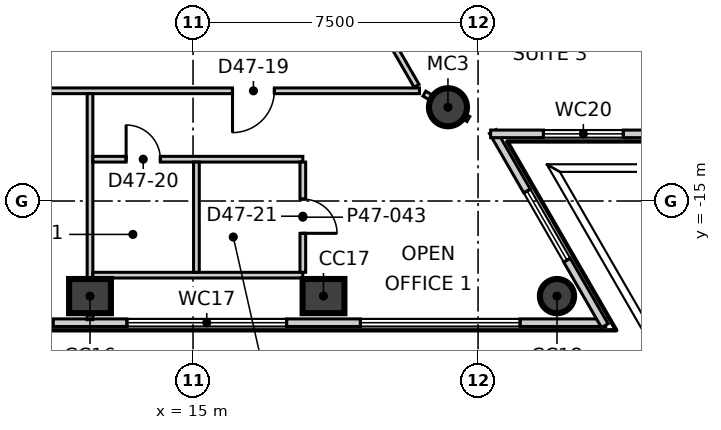
"""IFC4 building model, lengths in metres.
Left out: names, types, materials, properties, quantities, classifications, styles, units other than length and angle.
Written with IfcOpenShell. Run it as: python <this file> out.ifc"""

import sys

from ifc_helpers import new_model, si_unit, direction, frame, frame_2d, origin, origin_2d, place, context, subcontext, project, spatial, rectangle, circle, extrude, element, fill, save


model = new_model("IFC4")
c1 = context("Model", 3, precision=1e-05, world=origin(), true_north=direction((0.0, 1.0)))
c2 = subcontext(c1, "Body", "Model", "MODEL_VIEW")
j1 = project(units=[si_unit("LENGTHUNIT", "METRE"), si_unit("PLANEANGLEUNIT", "RADIAN")], contexts=[c1])
p1 = place(None, origin())
s1 = spatial("IfcSite", under=j1, at=p1, CompositionType="ELEMENT")
p2 = place(p1, origin())
s2 = spatial("IfcBuilding", under=s1, at=p2, CompositionType="ELEMENT")
p3 = place(p2, frame((0.0, 0.0, 203.3)))
s3 = spatial("IfcBuildingStorey", under=s2, at=p3, CompositionType="ELEMENT", Elevation=203.3)
for number, where, z_axis, x_axis in (
    (1, (12.289, -17.502, -0.3), (0.0, 0.0, 1.0), (1.0, 0.0, 0.0)),
    (2, (18.433, -17.502, -0.3), (0.0, 0.0, 1.0), (1.0, 0.0, 0.0)),
):
    element("IfcColumn", number, at=place(p3, frame(where, z_axis=z_axis, x_axis=x_axis)), inside=s3, PredefinedType="COLUMN", context=c2, shape_type="SweptSolid", body=[
        extrude(rectangle(XDim=1.1, YDim=0.9, at=origin_2d()), origin(), (0.0, 0.0, 1.0), 4.0),
    ])
p4 = place(p3, frame((24.577, -17.502, -0.3), z_axis=(0.0, 0.0, 1.0), x_axis=(1.0, 0.0, 0.0)))
e3 = element("IfcColumn", 3, at=p4, inside=s3, PredefinedType="COLUMN", context=c2, shape_type="SweptSolid", body=[
    extrude(circle(Radius=0.45, at=origin_2d()), origin(), (0.0, 0.0, 1.0), 4.0),
])
p5 = place(p3, frame((21.708, -12.533, -0.3), z_axis=(0.0, 0.0, 1.0), x_axis=(1.0, 0.0, 0.0)))
e4 = element("IfcColumn", 4, at=p5, inside=s3, PredefinedType="COLUMN", context=c2, shape_type="SweptSolid", body=[
    extrude(circle(Radius=0.5, at=origin_2d()), origin(), (0.0, 0.0, 1.0), 4.0),
])
p6 = place(p3, frame((-25.88, -18.202, 0.0), z_axis=(0.0, 0.0, 1.0), x_axis=(1.0, 0.0, 0.0)))
e5 = element("IfcWall", 5, at=p6, inside=s3, PredefinedType="ELEMENTEDWALL", context=c2, shape_type="SweptSolid", body=[
    extrude(rectangle(XDim=51.74, YDim=0.2, at=frame_2d((25.87, 0.0))), origin(), (0.0, 0.0, 1.0), 3.7),
])
p7 = place(p6, frame((2.275, 0.0, 0.9)))
e6 = element("IfcOpeningElement", 6, at=p7, cuts=e5, PredefinedType="OPENING", context=c2, shape_type="SweptSolid", body=[
    extrude(rectangle(XDim=4.2, YDim=2.5, at=frame_2d((2.1, 1.25))), frame((0.0, 0.11, 0.0), z_axis=(0.0, -1.0, 0.0), x_axis=(1.0, 0.0, 0.0)), (0.0, 0.0, 1.0), 0.22),
])
p8 = place(p6, frame((8.419, 0.0, 0.9)))
e7 = element("IfcOpeningElement", 7, at=p8, cuts=e5, PredefinedType="OPENING", context=c2, shape_type="SweptSolid", body=[
    extrude(rectangle(XDim=4.2, YDim=2.5, at=frame_2d((2.1, 1.25))), frame((0.0, 0.11, 0.0), z_axis=(0.0, -1.0, 0.0), x_axis=(1.0, 0.0, 0.0)), (0.0, 0.0, 1.0), 0.22),
])
p9 = place(p6, frame((14.564, 0.0, 0.9)))
e8 = element("IfcOpeningElement", 8, at=p9, cuts=e5, PredefinedType="OPENING", context=c2, shape_type="SweptSolid", body=[
    extrude(rectangle(XDim=4.2, YDim=2.5, at=frame_2d((2.1, 1.25))), frame((0.0, 0.11, 0.0), z_axis=(0.0, -1.0, 0.0), x_axis=(1.0, 0.0, 0.0)), (0.0, 0.0, 1.0), 0.22),
])
p10 = place(p6, frame((20.708, 0.0, 0.9)))
e9 = element("IfcOpeningElement", 9, at=p10, cuts=e5, PredefinedType="OPENING", context=c2, shape_type="SweptSolid", body=[
    extrude(rectangle(XDim=4.2, YDim=2.5, at=frame_2d((2.1, 1.25))), frame((0.0, 0.11, 0.0), z_axis=(0.0, -1.0, 0.0), x_axis=(1.0, 0.0, 0.0)), (0.0, 0.0, 1.0), 0.22),
])
p11 = place(p6, frame((26.852, 0.0, 0.9)))
e10 = element("IfcOpeningElement", 10, at=p11, cuts=e5, PredefinedType="OPENING", context=c2, shape_type="SweptSolid", body=[
    extrude(rectangle(XDim=4.2, YDim=2.5, at=frame_2d((2.1, 1.25))), frame((0.0, 0.11, 0.0), z_axis=(0.0, -1.0, 0.0), x_axis=(1.0, 0.0, 0.0)), (0.0, 0.0, 1.0), 0.22),
])
p12 = place(p6, frame((32.996, 0.0, 0.9)))
e11 = element("IfcOpeningElement", 11, at=p12, cuts=e5, PredefinedType="OPENING", context=c2, shape_type="SweptSolid", body=[
    extrude(rectangle(XDim=4.2, YDim=2.5, at=frame_2d((2.1, 1.25))), frame((0.0, 0.11, 0.0), z_axis=(0.0, -1.0, 0.0), x_axis=(1.0, 0.0, 0.0)), (0.0, 0.0, 1.0), 0.22),
])
p13 = place(p6, frame((39.141, 0.0, 0.9)))
e12 = element("IfcOpeningElement", 12, at=p13, cuts=e5, PredefinedType="OPENING", context=c2, shape_type="SweptSolid", body=[
    extrude(rectangle(XDim=4.2, YDim=2.5, at=frame_2d((2.1, 1.25))), frame((0.0, 0.11, 0.0), z_axis=(0.0, -1.0, 0.0), x_axis=(1.0, 0.0, 0.0)), (0.0, 0.0, 1.0), 0.22),
])
p14 = place(p6, frame((45.285, 0.0, 0.9)))
e13 = element("IfcOpeningElement", 13, at=p14, cuts=e5, PredefinedType="OPENING", context=c2, shape_type="SweptSolid", body=[
    extrude(rectangle(XDim=4.2, YDim=2.5, at=frame_2d((2.1, 1.25))), frame((0.0, 0.11, 0.0), z_axis=(0.0, -1.0, 0.0), x_axis=(1.0, 0.0, 0.0)), (0.0, 0.0, 1.0), 0.22),
])
p15 = place(p3, frame((25.835, -18.28, 0.0), z_axis=(0.0, 0.0, 1.0), x_axis=(-0.499989993172, 0.866031181152, 0.0)))
e14 = element("IfcWall", 14, at=p15, inside=s3, PredefinedType="ELEMENTEDWALL", context=c2, shape_type="SweptSolid", body=[
    extrude(rectangle(XDim=5.898, YDim=0.2, at=frame_2d((2.949, 0.0))), origin(), (0.0, 0.0, 1.0), 3.7),
])
p16 = place(p15, frame((1.99, 0.0, 0.9)))
e15 = element("IfcOpeningElement", 15, at=p16, cuts=e14, PredefinedType="OPENING", context=c2, shape_type="SweptSolid", body=[
    extrude(rectangle(XDim=2.1, YDim=2.5, at=frame_2d((1.05, 1.25))), frame((0.0, 0.11, 0.0), z_axis=(0.0, -1.0, 0.0), x_axis=(1.0, 0.0, 0.0)), (0.0, 0.0, 1.0), 0.22),
])
p17 = place(p3, frame((22.831, -13.233, 0.0), z_axis=(0.0, 0.0, 1.0), x_axis=(1.0, 0.0, 0.0)))
e16 = element("IfcWall", 16, at=p17, inside=s3, PredefinedType="ELEMENTEDWALL", context=c2, shape_type="SweptSolid", body=[
    extrude(rectangle(XDim=5.898, YDim=0.2, at=frame_2d((2.949, 0.0))), origin(), (0.0, 0.0, 1.0), 3.7),
])
p18 = place(p17, frame((1.39, 0.0, 0.9)))
e17 = element("IfcOpeningElement", 17, at=p18, cuts=e16, PredefinedType="OPENING", context=c2, shape_type="SweptSolid", body=[
    extrude(rectangle(XDim=2.1, YDim=2.5, at=frame_2d((1.05, 1.25))), frame((0.0, 0.11, 0.0), z_axis=(0.0, -1.0, 0.0), x_axis=(1.0, 0.0, 0.0)), (0.0, 0.0, 1.0), 0.22),
])
p19 = place(p3, frame((28.704, -13.311, 0.0), z_axis=(0.0, 0.0, 1.0), x_axis=(-0.500010281129, 0.866019467891, 0.0)))
e18 = element("IfcWall", 18, at=p19, inside=s3, PredefinedType="ELEMENTEDWALL", context=c2, shape_type="SweptSolid", body=[
    extrude(rectangle(XDim=51.739, YDim=0.2, at=frame_2d((25.87, 0.0))), origin(), (0.0, 0.0, 1.0), 3.7),
])
p20 = place(p19, frame((2.275, 0.0, 0.9)))
e19 = element("IfcOpeningElement", 19, at=p20, cuts=e18, PredefinedType="OPENING", context=c2, shape_type="SweptSolid", body=[
    extrude(rectangle(XDim=4.2, YDim=2.5, at=frame_2d((2.1, 1.25))), frame((0.0, 0.11, 0.0), z_axis=(0.0, -1.0, 0.0), x_axis=(1.0, 0.0, 0.0)), (0.0, 0.0, 1.0), 0.22),
])
p21 = place(p19, frame((8.419, 0.0, 0.9)))
e20 = element("IfcOpeningElement", 20, at=p21, cuts=e18, PredefinedType="OPENING", context=c2, shape_type="SweptSolid", body=[
    extrude(rectangle(XDim=4.2, YDim=2.5, at=frame_2d((2.1, 1.25))), frame((0.0, 0.11, 0.0), z_axis=(0.0, -1.0, 0.0), x_axis=(1.0, 0.0, 0.0)), (0.0, 0.0, 1.0), 0.22),
])
p22 = place(p19, frame((14.563, 0.0, 0.9)))
e21 = element("IfcOpeningElement", 21, at=p22, cuts=e18, PredefinedType="OPENING", context=c2, shape_type="SweptSolid", body=[
    extrude(rectangle(XDim=4.2, YDim=2.5, at=frame_2d((2.1, 1.25))), frame((0.0, 0.11, 0.0), z_axis=(0.0, -1.0, 0.0), x_axis=(1.0, 0.0, 0.0)), (0.0, 0.0, 1.0), 0.22),
])
p23 = place(p19, frame((20.707, 0.0, 0.9)))
e22 = element("IfcOpeningElement", 22, at=p23, cuts=e18, PredefinedType="OPENING", context=c2, shape_type="SweptSolid", body=[
    extrude(rectangle(XDim=4.2, YDim=2.5, at=frame_2d((2.1, 1.25))), frame((0.0, 0.11, 0.0), z_axis=(0.0, -1.0, 0.0), x_axis=(1.0, 0.0, 0.0)), (0.0, 0.0, 1.0), 0.22),
])
p24 = place(p19, frame((26.852, 0.0, 0.9)))
e23 = element("IfcOpeningElement", 23, at=p24, cuts=e18, PredefinedType="OPENING", context=c2, shape_type="SweptSolid", body=[
    extrude(rectangle(XDim=4.2, YDim=2.5, at=frame_2d((2.1, 1.25))), frame((0.0, 0.11, 0.0), z_axis=(0.0, -1.0, 0.0), x_axis=(1.0, 0.0, 0.0)), (0.0, 0.0, 1.0), 0.22),
])
p25 = place(p19, frame((32.996, 0.0, 0.9)))
e24 = element("IfcOpeningElement", 24, at=p25, cuts=e18, PredefinedType="OPENING", context=c2, shape_type="SweptSolid", body=[
    extrude(rectangle(XDim=4.2, YDim=2.5, at=frame_2d((2.1, 1.25))), frame((0.0, 0.11, 0.0), z_axis=(0.0, -1.0, 0.0), x_axis=(1.0, 0.0, 0.0)), (0.0, 0.0, 1.0), 0.22),
])
p26 = place(p19, frame((39.14, 0.0, 0.9)))
e25 = element("IfcOpeningElement", 25, at=p26, cuts=e18, PredefinedType="OPENING", context=c2, shape_type="SweptSolid", body=[
    extrude(rectangle(XDim=4.2, YDim=2.5, at=frame_2d((2.1, 1.25))), frame((0.0, 0.11, 0.0), z_axis=(0.0, -1.0, 0.0), x_axis=(1.0, 0.0, 0.0)), (0.0, 0.0, 1.0), 0.22),
])
p27 = place(p19, frame((45.284, 0.0, 0.9)))
e26 = element("IfcOpeningElement", 26, at=p27, cuts=e18, PredefinedType="OPENING", context=c2, shape_type="SweptSolid", body=[
    extrude(rectangle(XDim=4.2, YDim=2.5, at=frame_2d((2.1, 1.25))), frame((0.0, 0.11, 0.0), z_axis=(0.0, -1.0, 0.0), x_axis=(1.0, 0.0, 0.0)), (0.0, 0.0, 1.0), 0.22),
])
p28 = place(p3, frame((-20.808, -12.1, 0.0), z_axis=(0.0, 0.0, 1.0), x_axis=(1.0, 0.0, 0.0)))
e27 = element("IfcWall", 27, at=p28, inside=s3, PredefinedType="PARTITIONING", context=c2, shape_type="SweptSolid", body=[
    extrude(rectangle(XDim=41.766, YDim=0.15, at=frame_2d((20.883, 0.0))), origin(), (0.0, 0.0, 1.0), 3.7),
])
p29 = place(p28, frame((3.6, 0.0, 0.0)))
e28 = element("IfcOpeningElement", 28, at=p29, cuts=e27, PredefinedType="OPENING", context=c2, shape_type="SweptSolid", body=[
    extrude(rectangle(XDim=1.1, YDim=2.1, at=frame_2d((0.55, 1.05))), frame((0.0, 0.085, 0.0), z_axis=(0.0, -1.0, 0.0), x_axis=(1.0, 0.0, 0.0)), (0.0, 0.0, 1.0), 0.17),
])
p30 = place(p28, frame((17.07, 0.0, 0.0)))
e29 = element("IfcOpeningElement", 29, at=p30, cuts=e27, PredefinedType="OPENING", context=c2, shape_type="SweptSolid", body=[
    extrude(rectangle(XDim=1.1, YDim=2.1, at=frame_2d((0.55, 1.05))), frame((0.0, 0.085, 0.0), z_axis=(0.0, -1.0, 0.0), x_axis=(1.0, 0.0, 0.0)), (0.0, 0.0, 1.0), 0.17),
])
p31 = place(p28, frame((9.87, 0.0, 0.0)))
e30 = element("IfcOpeningElement", 30, at=p31, cuts=e27, PredefinedType="OPENING", context=c2, shape_type="SweptSolid", body=[
    extrude(rectangle(XDim=0.9, YDim=2.1, at=frame_2d((0.45, 1.05))), frame((0.0, 0.085, 0.0), z_axis=(0.0, -1.0, 0.0), x_axis=(1.0, 0.0, 0.0)), (0.0, 0.0, 1.0), 0.17),
])
p32 = place(p28, frame((12.87, 0.0, 0.0)))
e31 = element("IfcOpeningElement", 31, at=p32, cuts=e27, PredefinedType="OPENING", context=c2, shape_type="SweptSolid", body=[
    extrude(rectangle(XDim=0.9, YDim=2.1, at=frame_2d((0.45, 1.05))), frame((0.0, 0.085, 0.0), z_axis=(0.0, -1.0, 0.0), x_axis=(1.0, 0.0, 0.0)), (0.0, 0.0, 1.0), 0.17),
])
p33 = place(p28, frame((27.658, 0.0, 0.0)))
e32 = element("IfcOpeningElement", 32, at=p33, cuts=e27, PredefinedType="OPENING", context=c2, shape_type="SweptSolid", body=[
    extrude(rectangle(XDim=1.0, YDim=2.1, at=frame_2d((0.5, 1.05))), frame((0.0, 0.085, 0.0), z_axis=(0.0, -1.0, 0.0), x_axis=(1.0, 0.0, 0.0)), (0.0, 0.0, 1.0), 0.17),
])
p34 = place(p28, frame((21.558, 0.0, 0.0)))
e33 = element("IfcOpeningElement", 33, at=p34, cuts=e27, PredefinedType="OPENING", context=c2, shape_type="SweptSolid", body=[
    extrude(rectangle(XDim=0.9, YDim=2.1, at=frame_2d((0.45, 1.05))), frame((0.0, 0.085, 0.0), z_axis=(0.0, -1.0, 0.0), x_axis=(1.0, 0.0, 0.0)), (0.0, 0.0, 1.0), 0.17),
])
p35 = place(p28, frame((36.847, 0.0, 0.0)))
e34 = element("IfcOpeningElement", 34, at=p35, cuts=e27, PredefinedType="OPENING", context=c2, shape_type="SweptSolid", body=[
    extrude(rectangle(XDim=1.1, YDim=2.1, at=frame_2d((0.55, 1.05))), frame((0.0, 0.085, 0.0), z_axis=(0.0, -1.0, 0.0), x_axis=(1.0, 0.0, 0.0)), (0.0, 0.0, 1.0), 0.17),
])
p36 = place(p3, frame((21.087, -12.175, 0.0), z_axis=(0.0, 0.0, 1.0), x_axis=(0.8662585361, -0.499595985407, 0.0)))
e35 = element("IfcWall", 35, at=p36, inside=s3, PredefinedType="PARTITIONING", context=c2, shape_type="SweptSolid", body=[
    extrude(rectangle(XDim=1.337, YDim=0.15, at=frame_2d((0.668, 0.0))), origin(), (0.0, 0.0, 1.0), 3.2),
])
p37 = place(p3, frame((0.075, 24.07, 0.0), z_axis=(0.0, 0.0, 1.0), x_axis=(0.500006834213, -0.866021458014, 0.0)))
e36 = element("IfcWall", 36, at=p37, inside=s3, PredefinedType="PARTITIONING", context=c2, shape_type="SweptSolid", body=[
    extrude(rectangle(XDim=41.616, YDim=0.15, at=frame_2d((20.808, 0.0))), origin(), (0.0, 0.0, 1.0), 3.7),
])
p38 = place(p37, frame((36.915, 0.0, 0.0)))
e37 = element("IfcOpeningElement", 37, at=p38, cuts=e36, PredefinedType="OPENING", context=c2, shape_type="SweptSolid", body=[
    extrude(rectangle(XDim=1.1, YDim=2.1, at=frame_2d((0.55, 1.05))), frame((0.0, 0.085, 0.0), z_axis=(0.0, -1.0, 0.0), x_axis=(1.0, 0.0, 0.0)), (0.0, 0.0, 1.0), 0.17),
])
p39 = place(p37, frame((22.046, 0.0, 0.0)))
e38 = element("IfcOpeningElement", 38, at=p39, cuts=e36, PredefinedType="OPENING", context=c2, shape_type="SweptSolid", body=[
    extrude(rectangle(XDim=1.1, YDim=2.1, at=frame_2d((0.55, 1.05))), frame((0.0, 0.085, 0.0), z_axis=(0.0, -1.0, 0.0), x_axis=(1.0, 0.0, 0.0)), (0.0, 0.0, 1.0), 0.17),
])
p40 = place(p37, frame((31.046, 0.0, 0.0)))
e39 = element("IfcOpeningElement", 39, at=p40, cuts=e36, PredefinedType="OPENING", context=c2, shape_type="SweptSolid", body=[
    extrude(rectangle(XDim=0.9, YDim=2.1, at=frame_2d((0.45, 1.05))), frame((0.0, 0.085, 0.0), z_axis=(0.0, -1.0, 0.0), x_axis=(1.0, 0.0, 0.0)), (0.0, 0.0, 1.0), 0.17),
])
p41 = place(p37, frame((27.846, 0.0, 0.0)))
e40 = element("IfcOpeningElement", 40, at=p41, cuts=e36, PredefinedType="OPENING", context=c2, shape_type="SweptSolid", body=[
    extrude(rectangle(XDim=0.9, YDim=2.1, at=frame_2d((0.45, 1.05))), frame((0.0, 0.085, 0.0), z_axis=(0.0, -1.0, 0.0), x_axis=(1.0, 0.0, 0.0)), (0.0, 0.0, 1.0), 0.17),
])
p42 = place(p37, frame((24.946, 0.0, 0.0)))
e41 = element("IfcOpeningElement", 41, at=p42, cuts=e36, PredefinedType="OPENING", context=c2, shape_type="SweptSolid", body=[
    extrude(rectangle(XDim=1.0, YDim=2.1, at=frame_2d((0.5, 1.05))), frame((0.0, 0.085, 0.0), z_axis=(0.0, -1.0, 0.0), x_axis=(1.0, 0.0, 0.0)), (0.0, 0.0, 1.0), 0.17),
])
p43 = place(p37, frame((17.258, 0.0, 0.0)))
e42 = element("IfcOpeningElement", 42, at=p43, cuts=e36, PredefinedType="OPENING", context=c2, shape_type="SweptSolid", body=[
    extrude(rectangle(XDim=1.0, YDim=2.1, at=frame_2d((0.5, 1.05))), frame((0.0, 0.085, 0.0), z_axis=(0.0, -1.0, 0.0), x_axis=(1.0, 0.0, 0.0)), (0.0, 0.0, 1.0), 0.17),
])
p44 = place(p37, frame((11.114, 0.0, 0.0)))
e43 = element("IfcOpeningElement", 43, at=p44, cuts=e36, PredefinedType="OPENING", context=c2, shape_type="SweptSolid", body=[
    extrude(rectangle(XDim=1.0, YDim=2.1, at=frame_2d((0.5, 1.05))), frame((0.0, 0.085, 0.0), z_axis=(0.0, -1.0, 0.0), x_axis=(1.0, 0.0, 0.0)), (0.0, 0.0, 1.0), 0.17),
])
p45 = place(p37, frame((3.669, 0.0, 0.0)))
e44 = element("IfcOpeningElement", 44, at=p45, cuts=e36, PredefinedType="OPENING", context=c2, shape_type="SweptSolid", body=[
    extrude(rectangle(XDim=1.0, YDim=2.1, at=frame_2d((0.5, 1.05))), frame((0.0, 0.085, 0.0), z_axis=(0.0, -1.0, 0.0), x_axis=(1.0, 0.0, 0.0)), (0.0, 0.0, 1.0), 0.17),
])
p46 = place(p3, frame((12.289, -18.122, 0.0), z_axis=(0.0, 0.0, 1.0), x_axis=(0.0, 1.0, 0.0)))
e45 = element("IfcWall", 45, at=p46, inside=s3, PredefinedType="PARTITIONING", context=c2, shape_type="SweptSolid", body=[
    extrude(rectangle(XDim=5.947, YDim=0.15, at=frame_2d((2.974, 0.0))), origin(), (0.0, 0.0, 1.0), 3.7),
])
p47 = place(p3, frame((12.364, -13.9, 0.0), z_axis=(0.0, 0.0, 1.0), x_axis=(1.0, 0.0, 0.0)))
e46 = element("IfcWall", 46, at=p47, inside=s3, PredefinedType="PARTITIONING", context=c2, shape_type="SweptSolid", body=[
    extrude(rectangle(XDim=5.525, YDim=0.15, at=frame_2d((2.762, 0.0))), origin(), (0.0, 0.0, 1.0), 3.7),
])
p48 = place(p47, frame((0.875, 0.0, 0.0)))
e47 = element("IfcOpeningElement", 47, at=p48, cuts=e46, PredefinedType="OPENING", context=c2, shape_type="SweptSolid", body=[
    extrude(rectangle(XDim=0.9, YDim=2.1, at=frame_2d((0.45, 1.05))), frame((0.0, 0.085, 0.0), z_axis=(0.0, -1.0, 0.0), x_axis=(1.0, 0.0, 0.0)), (0.0, 0.0, 1.0), 0.17),
])
p49 = place(p3, frame((12.364, -16.951, 0.0), z_axis=(0.0, 0.0, 1.0), x_axis=(1.0, 0.0, 0.0)))
e48 = element("IfcWall", 48, at=p49, inside=s3, PredefinedType="PARTITIONING", context=c2, shape_type="SweptSolid", body=[
    extrude(rectangle(XDim=5.525, YDim=0.15, at=frame_2d((2.762, 0.0))), origin(), (0.0, 0.0, 1.0), 3.7),
])
p50 = place(p3, frame((17.889, -16.876, 0.0), z_axis=(0.0, 0.0, 1.0), x_axis=(0.0, 1.0, 0.0)))
e49 = element("IfcWall", 49, at=p50, inside=s3, PredefinedType="PARTITIONING", context=c2, shape_type="SweptSolid", body=[
    extrude(rectangle(XDim=2.901, YDim=0.15, at=frame_2d((1.45, 0.0))), origin(), (0.0, 0.0, 1.0), 3.7),
])
p51 = place(p50, frame((1.026, 0.0, 0.0)))
e50 = element("IfcOpeningElement", 50, at=p51, cuts=e49, PredefinedType="OPENING", context=c2, shape_type="SweptSolid", body=[
    extrude(rectangle(XDim=0.9, YDim=2.1, at=frame_2d((0.45, 1.05))), frame((0.0, 0.085, 0.0), z_axis=(0.0, -1.0, 0.0), x_axis=(1.0, 0.0, 0.0)), (0.0, 0.0, 1.0), 0.17),
])
p52 = place(p3, frame((15.089, -16.876, 0.0), z_axis=(0.0, 0.0, 1.0), x_axis=(0.0, 1.0, 0.0)))
e51 = element("IfcWall", 51, at=p52, inside=s3, PredefinedType="PARTITIONING", context=c2, shape_type="SweptSolid", body=[
    extrude(rectangle(XDim=2.901, YDim=0.15, at=frame_2d((1.45, 0.0))), origin(), (0.0, 0.0, 1.0), 3.7),
])
p53 = place(p12, origin())
e52 = element("IfcWindow", 52, at=p53, inside=s3, PartitioningType="SINGLE_PANEL", PredefinedType="WINDOW", context=c2, shape_type="SweptSolid", body=[
    extrude(rectangle(XDim=4.2, YDim=2.5, at=frame_2d((2.1, 1.25))), frame((0.0, 0.03, 0.0), z_axis=(0.0, -1.0, 0.0), x_axis=(1.0, 0.0, 0.0)), (0.0, 0.0, 1.0), 0.06),
])
fill(e11, e52)
p54 = place(p13, origin())
e53 = element("IfcWindow", 53, at=p54, inside=s3, PartitioningType="SINGLE_PANEL", PredefinedType="WINDOW", context=c2, shape_type="SweptSolid", body=[
    extrude(rectangle(XDim=4.2, YDim=2.5, at=frame_2d((2.1, 1.25))), frame((0.0, 0.03, 0.0), z_axis=(0.0, -1.0, 0.0), x_axis=(1.0, 0.0, 0.0)), (0.0, 0.0, 1.0), 0.06),
])
fill(e12, e53)
p55 = place(p14, origin())
e54 = element("IfcWindow", 54, at=p55, inside=s3, PartitioningType="SINGLE_PANEL", PredefinedType="WINDOW", context=c2, shape_type="SweptSolid", body=[
    extrude(rectangle(XDim=4.2, YDim=2.5, at=frame_2d((2.1, 1.25))), frame((0.0, 0.03, 0.0), z_axis=(0.0, -1.0, 0.0), x_axis=(1.0, 0.0, 0.0)), (0.0, 0.0, 1.0), 0.06),
])
fill(e13, e54)
p56 = place(p16, origin())
e55 = element("IfcWindow", 55, at=p56, inside=s3, PartitioningType="SINGLE_PANEL", PredefinedType="WINDOW", context=c2, shape_type="SweptSolid", body=[
    extrude(rectangle(XDim=2.1, YDim=2.5, at=frame_2d((1.05, 1.25))), frame((0.0, 0.03, 0.0), z_axis=(0.0, -1.0, 0.0), x_axis=(1.0, 0.0, 0.0)), (0.0, 0.0, 1.0), 0.06),
])
fill(e15, e55)
p57 = place(p18, origin())
e56 = element("IfcWindow", 56, at=p57, inside=s3, PartitioningType="SINGLE_PANEL", PredefinedType="WINDOW", context=c2, shape_type="SweptSolid", body=[
    extrude(rectangle(XDim=2.1, YDim=2.5, at=frame_2d((1.05, 1.25))), frame((0.0, 0.03, 0.0), z_axis=(0.0, -1.0, 0.0), x_axis=(1.0, 0.0, 0.0)), (0.0, 0.0, 1.0), 0.06),
])
fill(e17, e56)
p58 = place(p20, origin())
e57 = element("IfcWindow", 57, at=p58, inside=s3, PartitioningType="SINGLE_PANEL", PredefinedType="WINDOW", context=c2, shape_type="SweptSolid", body=[
    extrude(rectangle(XDim=4.2, YDim=2.5, at=frame_2d((2.1, 1.25))), frame((0.0, 0.03, 0.0), z_axis=(0.0, -1.0, 0.0), x_axis=(1.0, 0.0, 0.0)), (0.0, 0.0, 1.0), 0.06),
])
fill(e19, e57)
p59 = place(p35, origin())
e58 = element("IfcDoor", 58, at=p59, inside=s3, OperationType="SINGLE_SWING_LEFT", PredefinedType="DOOR", context=c2, shape_type="SweptSolid", body=[
    extrude(rectangle(XDim=1.1, YDim=2.1, at=frame_2d((0.55, 1.05))), frame((0.0, 0.025, 0.0), z_axis=(0.0, -1.0, 0.0), x_axis=(1.0, 0.0, 0.0)), (0.0, 0.0, 1.0), 0.05),
])
fill(e34, e58)
p60 = place(p48, origin())
e59 = element("IfcDoor", 59, at=p60, inside=s3, OperationType="SINGLE_SWING_RIGHT", PredefinedType="DOOR", context=c2, shape_type="SweptSolid", body=[
    extrude(rectangle(XDim=0.9, YDim=2.1, at=frame_2d((0.45, 1.05))), frame((0.0, 0.025, 0.0), z_axis=(0.0, -1.0, 0.0), x_axis=(1.0, 0.0, 0.0)), (0.0, 0.0, 1.0), 0.05),
])
fill(e47, e59)
p61 = place(p51, origin())
e60 = element("IfcDoor", 60, at=p61, inside=s3, OperationType="SINGLE_SWING_LEFT", PredefinedType="DOOR", context=c2, shape_type="SweptSolid", body=[
    extrude(rectangle(XDim=0.9, YDim=2.1, at=frame_2d((0.45, 1.05))), frame((0.0, 0.025, 0.0), z_axis=(0.0, -1.0, 0.0), x_axis=(1.0, 0.0, 0.0)), (0.0, 0.0, 1.0), 0.05),
])
fill(e50, e60)
save(model, sys.argv[1])
